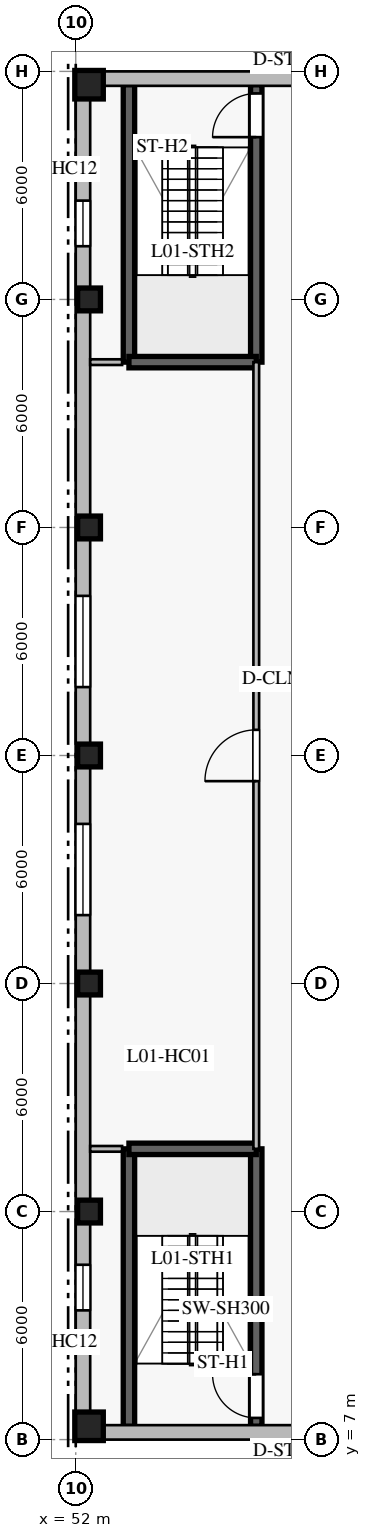
"""IFC4 building model, lengths in metres.
Left out: names, types, materials, properties, quantities, classifications, styles, units other than length and angle.
Written with IfcOpenShell. Run it as: python <this file> out.ifc"""

import sys

from ifc_helpers import new_model, si_unit, direction, frame, frame_2d, origin, origin_2d, place, context, subcontext, project, spatial, rectangle, extrude, element, fill, save


model = new_model("IFC4")
c1 = context("Model", 3, precision=1e-05, world=origin(), true_north=direction((0.0, 1.0)))
c2 = subcontext(c1, "Body", "Model", "MODEL_VIEW")
j1 = project(units=[si_unit("LENGTHUNIT", "METRE"), si_unit("PLANEANGLEUNIT", "RADIAN")], contexts=[c1])
p1 = place(None, origin())
s1 = spatial("IfcSite", under=j1, at=p1, CompositionType="ELEMENT")
p2 = place(p1, origin())
s2 = spatial("IfcBuilding", under=s1, at=p2, CompositionType="ELEMENT")
p3 = place(p2, frame((0.0, 0.0, 5.2)))
s3 = spatial("IfcBuildingStorey", under=s2, at=p3, CompositionType="ELEMENT", Elevation=5.2)
p4 = place(p3, frame((56.75, 7.35, 0.0), z_axis=(0.0, 0.0, 1.0), x_axis=(0.0, 1.0, 0.0)))
e1 = element("IfcWall", 1, at=p4, inside=s3, PredefinedType="SOLIDWALL", context=c2, shape_type="SweptSolid", body=[
    extrude(rectangle(XDim=7.3, YDim=0.3, at=frame_2d((3.65, 0.0))), origin(), (0.0, 0.0, 1.0), 4.34),
])
p5 = place(p4, frame((0.22, 0.0, 0.0)))
e2 = element("IfcOpeningElement", 2, at=p5, cuts=e1, PredefinedType="OPENING", context=c2, shape_type="SweptSolid", body=[
    extrude(rectangle(XDim=1.15, YDim=2.2, at=frame_2d((0.575, 1.1))), frame((0.0, 0.16, 0.0), z_axis=(0.0, -1.0, 0.0), x_axis=(1.0, 0.0, 0.0)), (0.0, 0.0, 1.0), 0.32),
])
p6 = place(p3, frame((53.4, 7.35, 0.0), z_axis=(0.0, 0.0, 1.0), x_axis=(0.0, 1.0, 0.0)))
e3 = element("IfcWall", 3, at=p6, inside=s3, PredefinedType="SOLIDWALL", context=c2, shape_type="SweptSolid", body=[
    extrude(rectangle(XDim=7.3, YDim=0.3, at=frame_2d((3.65, 0.0))), origin(), (0.0, 0.0, 1.0), 4.34),
])
p7 = place(p3, frame((53.4, 14.65, 0.0), z_axis=(0.0, 0.0, 1.0), x_axis=(1.0, 0.0, 0.0)))
e4 = element("IfcWall", 4, at=p7, inside=s3, PredefinedType="SOLIDWALL", context=c2, shape_type="SweptSolid", body=[
    extrude(rectangle(XDim=3.35, YDim=0.3, at=frame_2d((1.675, 0.0))), origin(), (0.0, 0.0, 1.0), 4.34),
])
p8 = place(p3, frame((56.75, 35.35, 0.0), z_axis=(0.0, 0.0, 1.0), x_axis=(0.0, 1.0, 0.0)))
e5 = element("IfcWall", 5, at=p8, inside=s3, PredefinedType="SOLIDWALL", context=c2, shape_type="SweptSolid", body=[
    extrude(rectangle(XDim=7.3, YDim=0.3, at=frame_2d((3.65, 0.0))), origin(), (0.0, 0.0, 1.0), 4.34),
])
p9 = place(p8, frame((5.92, 0.0, 0.0)))
e6 = element("IfcOpeningElement", 6, at=p9, cuts=e5, PredefinedType="OPENING", context=c2, shape_type="SweptSolid", body=[
    extrude(rectangle(XDim=1.15, YDim=2.2, at=frame_2d((0.575, 1.1))), frame((0.0, 0.16, 0.0), z_axis=(0.0, -1.0, 0.0), x_axis=(1.0, 0.0, 0.0)), (0.0, 0.0, 1.0), 0.32),
])
p10 = place(p3, frame((53.4, 35.35, 0.0), z_axis=(0.0, 0.0, 1.0), x_axis=(0.0, 1.0, 0.0)))
e7 = element("IfcWall", 7, at=p10, inside=s3, PredefinedType="SOLIDWALL", context=c2, shape_type="SweptSolid", body=[
    extrude(rectangle(XDim=7.3, YDim=0.3, at=frame_2d((3.65, 0.0))), origin(), (0.0, 0.0, 1.0), 4.34),
])
p11 = place(p3, frame((53.4, 35.35, 0.0), z_axis=(0.0, 0.0, 1.0), x_axis=(1.0, 0.0, 0.0)))
e8 = element("IfcWall", 8, at=p11, inside=s3, PredefinedType="SOLIDWALL", context=c2, shape_type="SweptSolid", body=[
    extrude(rectangle(XDim=3.35, YDim=0.3, at=frame_2d((1.675, 0.0))), origin(), (0.0, 0.0, 1.0), 4.34),
])
p12 = place(p3, frame((52.35, 7.35, 0.0), z_axis=(0.0, 0.0, 1.0), x_axis=(1.0, 0.0, 0.0)))
e9 = element("IfcColumn", 9, at=p12, inside=s3, PredefinedType="COLUMN", context=c2, shape_type="SweptSolid", body=[
    extrude(rectangle(XDim=0.75, YDim=0.75, at=origin_2d()), origin(), (0.0, 0.0, 1.0), 4.6),
])
for number, where, z_axis, x_axis in (
    (10, (52.35, 13.0, 0.0), (0.0, 0.0, 1.0), (1.0, 0.0, 0.0)),
    (11, (52.35, 19.0, 0.0), (0.0, 0.0, 1.0), (1.0, 0.0, 0.0)),
    (12, (52.35, 25.0, 0.0), (0.0, 0.0, 1.0), (1.0, 0.0, 0.0)),
    (13, (52.35, 31.0, 0.0), (0.0, 0.0, 1.0), (1.0, 0.0, 0.0)),
    (14, (52.35, 37.0, 0.0), (0.0, 0.0, 1.0), (1.0, 0.0, 0.0)),
):
    element("IfcColumn", number, at=place(p3, frame(where, z_axis=z_axis, x_axis=x_axis)), inside=s3, PredefinedType="COLUMN", context=c2, shape_type="SweptSolid", body=[
        extrude(rectangle(XDim=0.6, YDim=0.6, at=origin_2d()), origin(), (0.0, 0.0, 1.0), 4.6),
    ])
p13 = place(p3, frame((52.35, 42.65, 0.0), z_axis=(0.0, 0.0, 1.0), x_axis=(1.0, 0.0, 0.0)))
e15 = element("IfcColumn", 15, at=p13, inside=s3, PredefinedType="COLUMN", context=c2, shape_type="SweptSolid", body=[
    extrude(rectangle(XDim=0.75, YDim=0.75, at=origin_2d()), origin(), (0.0, 0.0, 1.0), 4.6),
])
p14 = place(p3, frame((75.0, 7.19, 0.0), z_axis=(0.0, 0.0, 1.0), x_axis=(-1.0, 0.0, 0.0)))
e16 = element("IfcWall", 16, at=p14, inside=s3, PredefinedType="STANDARD", context=c2, shape_type="SweptSolid", body=[
    extrude(rectangle(XDim=23.0, YDim=0.38, at=frame_2d((11.5, 0.0))), origin(), (0.0, 0.0, 1.0), 4.34),
])
p15 = place(p14, frame((10.3, 0.0, 0.95)))
e17 = element("IfcOpeningElement", 17, at=p15, cuts=e16, PredefinedType="OPENING", context=c2, shape_type="SweptSolid", body=[
    extrude(rectangle(XDim=2.4, YDim=1.8, at=frame_2d((1.2, 0.9))), frame((0.0, 0.2, 0.0), z_axis=(0.0, -1.0, 0.0), x_axis=(1.0, 0.0, 0.0)), (0.0, 0.0, 1.0), 0.4),
])
p16 = place(p3, frame((52.0, 42.81, 0.0), z_axis=(0.0, 0.0, 1.0), x_axis=(1.0, 0.0, 0.0)))
e18 = element("IfcWall", 18, at=p16, inside=s3, PredefinedType="STANDARD", context=c2, shape_type="SweptSolid", body=[
    extrude(rectangle(XDim=23.0, YDim=0.38, at=frame_2d((11.5, 0.0))), origin(), (0.0, 0.0, 1.0), 4.34),
])
p17 = place(p16, frame((10.3, 0.0, 0.95)))
e19 = element("IfcOpeningElement", 19, at=p17, cuts=e18, PredefinedType="OPENING", context=c2, shape_type="SweptSolid", body=[
    extrude(rectangle(XDim=2.4, YDim=1.8, at=frame_2d((1.2, 0.9))), frame((0.0, 0.2, 0.0), z_axis=(0.0, -1.0, 0.0), x_axis=(1.0, 0.0, 0.0)), (0.0, 0.0, 1.0), 0.4),
])
p18 = place(p3, frame((52.19, 7.38, 0.0), z_axis=(0.0, 0.0, 1.0), x_axis=(0.0, 1.0, 0.0)))
e20 = element("IfcWall", 20, at=p18, inside=s3, PredefinedType="STANDARD", context=c2, shape_type="SweptSolid", body=[
    extrude(rectangle(XDim=35.24, YDim=0.38, at=frame_2d((17.62, 0.0))), origin(), (0.0, 0.0, 1.0), 4.34),
])
p19 = place(p18, frame((3.02, 0.0, 0.95)))
e21 = element("IfcOpeningElement", 21, at=p19, cuts=e20, PredefinedType="OPENING", context=c2, shape_type="SweptSolid", body=[
    extrude(rectangle(XDim=1.2, YDim=1.8, at=frame_2d((0.6, 0.9))), frame((0.0, 0.2, 0.0), z_axis=(0.0, -1.0, 0.0), x_axis=(1.0, 0.0, 0.0)), (0.0, 0.0, 1.0), 0.4),
])
p20 = place(p18, frame((13.42, 0.0, 0.95)))
e22 = element("IfcOpeningElement", 22, at=p20, cuts=e20, PredefinedType="OPENING", context=c2, shape_type="SweptSolid", body=[
    extrude(rectangle(XDim=2.4, YDim=1.8, at=frame_2d((1.2, 0.9))), frame((0.0, 0.2, 0.0), z_axis=(0.0, -1.0, 0.0), x_axis=(1.0, 0.0, 0.0)), (0.0, 0.0, 1.0), 0.4),
])
p21 = place(p18, frame((19.42, 0.0, 0.95)))
e23 = element("IfcOpeningElement", 23, at=p21, cuts=e20, PredefinedType="OPENING", context=c2, shape_type="SweptSolid", body=[
    extrude(rectangle(XDim=2.4, YDim=1.8, at=frame_2d((1.2, 0.9))), frame((0.0, 0.2, 0.0), z_axis=(0.0, -1.0, 0.0), x_axis=(1.0, 0.0, 0.0)), (0.0, 0.0, 1.0), 0.4),
])
p22 = place(p18, frame((31.02, 0.0, 0.95)))
e24 = element("IfcOpeningElement", 24, at=p22, cuts=e20, PredefinedType="OPENING", context=c2, shape_type="SweptSolid", body=[
    extrude(rectangle(XDim=1.2, YDim=1.8, at=frame_2d((0.6, 0.9))), frame((0.0, 0.2, 0.0), z_axis=(0.0, -1.0, 0.0), x_axis=(1.0, 0.0, 0.0)), (0.0, 0.0, 1.0), 0.4),
])
p23 = place(p3, frame((56.75, 14.65, 0.0), z_axis=(0.0, 0.0, 1.0), x_axis=(0.0, 1.0, 0.0)))
e25 = element("IfcWall", 25, at=p23, inside=s3, PredefinedType="PARTITIONING", context=c2, shape_type="SweptSolid", body=[
    extrude(rectangle(XDim=20.7, YDim=0.15, at=frame_2d((10.35, 0.0))), origin(), (0.0, 0.0, 1.0), 4.34),
])
p24 = place(p23, frame((9.675, 0.0, 0.0)))
e26 = element("IfcOpeningElement", 26, at=p24, cuts=e25, PredefinedType="OPENING", context=c2, shape_type="SweptSolid", body=[
    extrude(rectangle(XDim=1.35, YDim=2.2, at=frame_2d((0.675, 1.1))), frame((0.0, 0.085, 0.0), z_axis=(0.0, -1.0, 0.0), x_axis=(1.0, 0.0, 0.0)), (0.0, 0.0, 1.0), 0.17),
])
for number, where, z_axis, x_axis in (
    (27, (52.38, 14.65, 0.0), (0.0, 0.0, 1.0), (1.0, 0.0, 0.0)),
    (28, (52.38, 35.35, 0.0), (0.0, 0.0, 1.0), (1.0, 0.0, 0.0)),
):
    element("IfcWall", number, at=place(p3, frame(where, z_axis=z_axis, x_axis=x_axis)), inside=s3, PredefinedType="PARTITIONING", context=c2, shape_type="SweptSolid", body=[
        extrude(rectangle(XDim=0.84, YDim=0.15, at=frame_2d((0.42, 0.0))), origin(), (0.0, 0.0, 1.0), 3.98),
    ])
p25 = place(p19, origin())
e29 = element("IfcWindow", 29, at=p25, inside=s3, PartitioningType="SINGLE_PANEL", PredefinedType="WINDOW", context=c2, shape_type="SweptSolid", body=[
    extrude(rectangle(XDim=1.2, YDim=1.8, at=frame_2d((0.6, 0.9))), frame((0.0, 0.03, 0.0), z_axis=(0.0, -1.0, 0.0), x_axis=(1.0, 0.0, 0.0)), (0.0, 0.0, 1.0), 0.06),
])
fill(e21, e29)
p26 = place(p20, origin())
e30 = element("IfcWindow", 30, at=p26, inside=s3, PartitioningType="TRIPLE_PANEL_VERTICAL", PredefinedType="WINDOW", context=c2, shape_type="SweptSolid", body=[
    extrude(rectangle(XDim=2.4, YDim=1.8, at=frame_2d((1.2, 0.9))), frame((0.0, 0.03, 0.0), z_axis=(0.0, -1.0, 0.0), x_axis=(1.0, 0.0, 0.0)), (0.0, 0.0, 1.0), 0.06),
])
fill(e22, e30)
p27 = place(p21, origin())
e31 = element("IfcWindow", 31, at=p27, inside=s3, PartitioningType="TRIPLE_PANEL_VERTICAL", PredefinedType="WINDOW", context=c2, shape_type="SweptSolid", body=[
    extrude(rectangle(XDim=2.4, YDim=1.8, at=frame_2d((1.2, 0.9))), frame((0.0, 0.03, 0.0), z_axis=(0.0, -1.0, 0.0), x_axis=(1.0, 0.0, 0.0)), (0.0, 0.0, 1.0), 0.06),
])
fill(e23, e31)
p28 = place(p22, origin())
e32 = element("IfcWindow", 32, at=p28, inside=s3, PartitioningType="SINGLE_PANEL", PredefinedType="WINDOW", context=c2, shape_type="SweptSolid", body=[
    extrude(rectangle(XDim=1.2, YDim=1.8, at=frame_2d((0.6, 0.9))), frame((0.0, 0.03, 0.0), z_axis=(0.0, -1.0, 0.0), x_axis=(1.0, 0.0, 0.0)), (0.0, 0.0, 1.0), 0.06),
])
fill(e24, e32)
p29 = place(p5, origin())
e33 = element("IfcDoor", 33, at=p29, inside=s3, OperationType="SINGLE_SWING_RIGHT", PredefinedType="DOOR", context=c2, shape_type="SweptSolid", body=[
    extrude(rectangle(XDim=1.15, YDim=2.2, at=frame_2d((0.575, 1.1))), frame((0.0, 0.025, 0.0), z_axis=(0.0, -1.0, 0.0), x_axis=(1.0, 0.0, 0.0)), (0.0, 0.0, 1.0), 0.05),
])
fill(e2, e33)
p30 = place(p9, origin())
e34 = element("IfcDoor", 34, at=p30, inside=s3, OperationType="SINGLE_SWING_LEFT", PredefinedType="DOOR", context=c2, shape_type="SweptSolid", body=[
    extrude(rectangle(XDim=1.15, YDim=2.2, at=frame_2d((0.575, 1.1))), frame((0.0, 0.025, 0.0), z_axis=(0.0, -1.0, 0.0), x_axis=(1.0, 0.0, 0.0)), (0.0, 0.0, 1.0), 0.05),
])
fill(e6, e34)
p31 = place(p24, origin())
e35 = element("IfcDoor", 35, at=p31, inside=s3, OperationType="SINGLE_SWING_LEFT", PredefinedType="DOOR", context=c2, shape_type="SweptSolid", body=[
    extrude(rectangle(XDim=1.35, YDim=2.2, at=frame_2d((0.675, 1.1))), frame((0.0, 0.025, 0.0), z_axis=(0.0, -1.0, 0.0), x_axis=(1.0, 0.0, 0.0)), (0.0, 0.0, 1.0), 0.05),
])
fill(e26, e35)
save(model, sys.argv[1])
